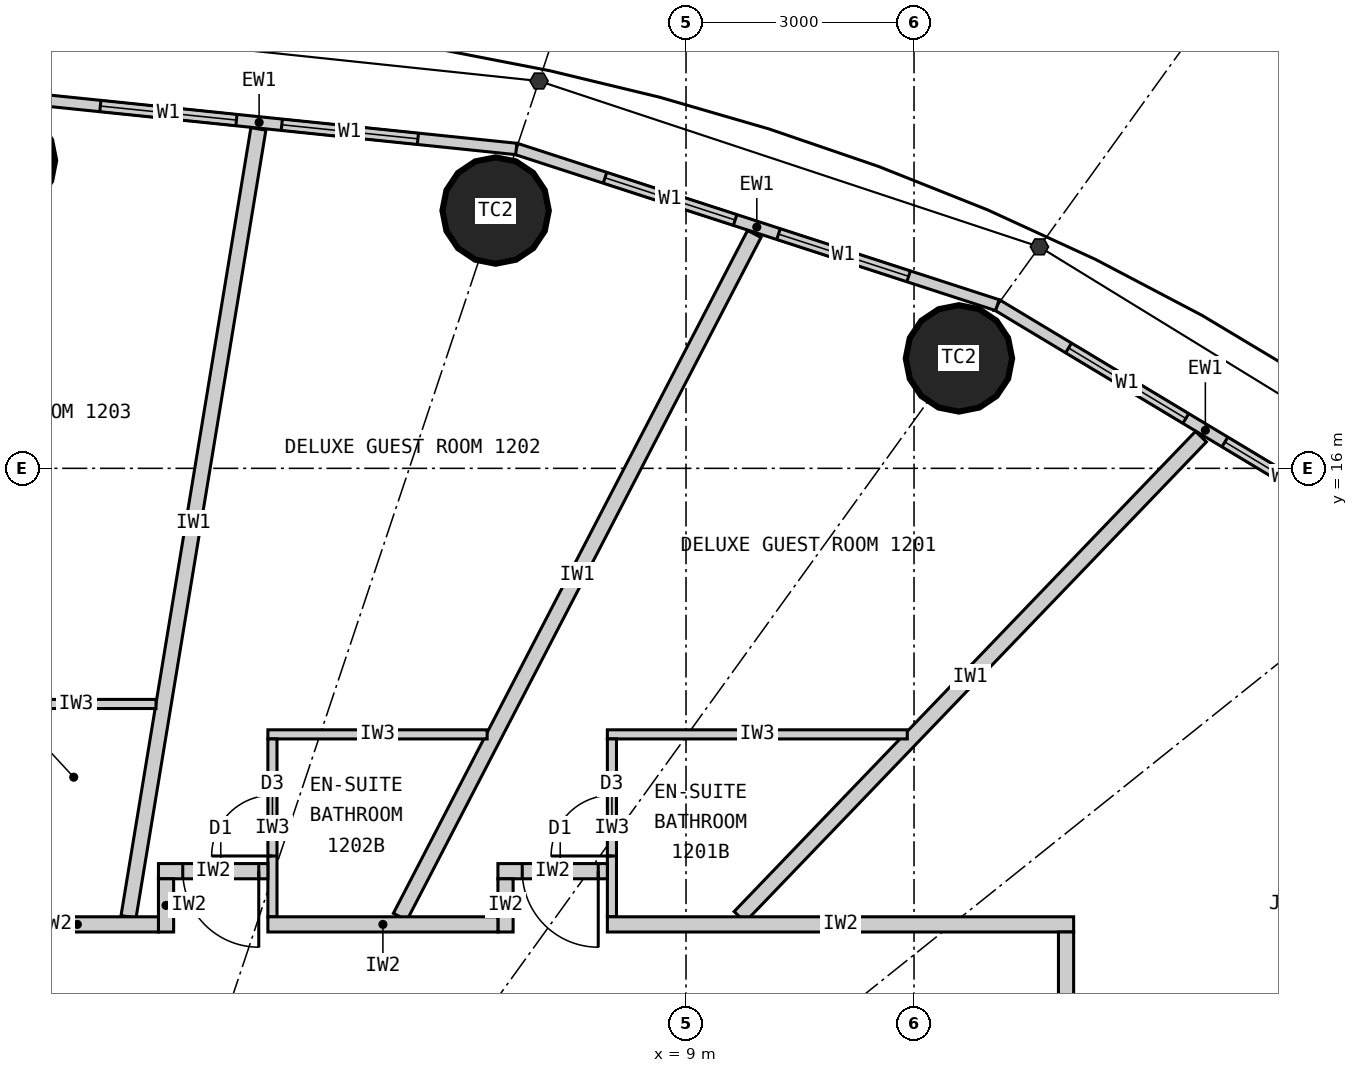
"""IFC4 building model, lengths in metres.
Left out: names, types, materials, properties, quantities, classifications, styles, units other than length and angle.
Written with IfcOpenShell. Run it as: python <this file> out.ifc"""

import sys

from ifc_helpers import new_model, si_unit, direction, frame, frame_2d, origin, origin_2d, place, context, subcontext, project, spatial, rectangle, circle, extrude, element, fill, save


model = new_model("IFC4")
c1 = context("Model", 3, precision=1e-05, world=origin(), true_north=direction((0.0, 1.0)))
c2 = subcontext(c1, "Body", "Model", "MODEL_VIEW")
j1 = project(units=[si_unit("LENGTHUNIT", "METRE"), si_unit("PLANEANGLEUNIT", "RADIAN")], contexts=[c1])
p1 = place(None, origin())
s1 = spatial("IfcSite", under=j1, at=p1, CompositionType="ELEMENT")
p2 = place(p1, origin())
s2 = spatial("IfcBuilding", under=s1, at=p2, CompositionType="ELEMENT")
p3 = place(p2, frame((0.0, 0.0, 54.0)))
s3 = spatial("IfcBuildingStorey", under=s2, at=p3, CompositionType="ELEMENT", Elevation=54.0)
for number, where, z_axis, x_axis in (
    (1, (12.591, 17.447, 0.0), (0.0, 0.0, 1.0), (1.0, 0.0, 0.0)),
    (2, (6.495, 19.391, 0.0), (0.0, 0.0, 1.0), (1.0, 0.0, 0.0)),
    (3, (0.0, 20.05, 0.0), (0.0, 0.0, 1.0), (1.0, 0.0, 0.0)),
):
    element("IfcColumn", number, at=place(p3, frame(where, z_axis=z_axis, x_axis=x_axis)), inside=s3, PredefinedType="COLUMN", context=c2, shape_type="SweptSolid", body=[
        extrude(circle(Radius=0.7, at=origin_2d()), origin(), (0.0, 0.0, 1.0), 3.3),
    ])
p4 = place(p3, frame((18.57, 14.856, 0.0), z_axis=(0.0, 0.0, 1.0), x_axis=(-0.856983180864, 0.515344377787, 0.0)))
e4 = element("IfcWall", 4, at=p4, inside=s3, PredefinedType="ELEMENTEDWALL", context=c2, shape_type="SweptSolid", body=[
    extrude(rectangle(XDim=6.386, YDim=0.15, at=frame_2d((3.193, 0.0))), origin(), (0.0, 0.0, 1.0), 3.12),
])
p5 = place(p4, frame((1.093, 0.0, 0.9)))
e5 = element("IfcOpeningElement", 5, at=p5, cuts=e4, PredefinedType="OPENING", context=c2, shape_type="SweptSolid", body=[
    extrude(rectangle(XDim=1.8, YDim=1.9, at=frame_2d((0.9, 0.95))), frame((0.0, 0.085, 0.0), z_axis=(0.0, -1.0, 0.0), x_axis=(1.0, 0.0, 0.0)), (0.0, 0.0, 1.0), 0.17),
])
p6 = place(p4, frame((3.493, 0.0, 0.9)))
e6 = element("IfcOpeningElement", 6, at=p6, cuts=e4, PredefinedType="OPENING", context=c2, shape_type="SweptSolid", body=[
    extrude(rectangle(XDim=1.8, YDim=1.9, at=frame_2d((0.9, 0.95))), frame((0.0, 0.085, 0.0), z_axis=(0.0, -1.0, 0.0), x_axis=(1.0, 0.0, 0.0)), (0.0, 0.0, 1.0), 0.17),
])
p7 = place(p3, frame((13.096, 18.147, 0.0), z_axis=(0.0, 0.0, 1.0), x_axis=(-0.951137534625, 0.308767534285, 0.0)))
e7 = element("IfcWall", 7, at=p7, inside=s3, PredefinedType="ELEMENTEDWALL", context=c2, shape_type="SweptSolid", body=[
    extrude(rectangle(XDim=6.655, YDim=0.15, at=frame_2d((3.328, 0.0))), origin(), (0.0, 0.0, 1.0), 3.12),
])
p8 = place(p7, frame((1.228, 0.0, 0.9)))
e8 = element("IfcOpeningElement", 8, at=p8, cuts=e7, PredefinedType="OPENING", context=c2, shape_type="SweptSolid", body=[
    extrude(rectangle(XDim=1.8, YDim=1.9, at=frame_2d((0.9, 0.95))), frame((0.0, 0.085, 0.0), z_axis=(0.0, -1.0, 0.0), x_axis=(1.0, 0.0, 0.0)), (0.0, 0.0, 1.0), 0.17),
])
p9 = place(p7, frame((3.628, 0.0, 0.9)))
e9 = element("IfcOpeningElement", 9, at=p9, cuts=e7, PredefinedType="OPENING", context=c2, shape_type="SweptSolid", body=[
    extrude(rectangle(XDim=1.8, YDim=1.9, at=frame_2d((0.9, 0.95))), frame((0.0, 0.085, 0.0), z_axis=(0.0, -1.0, 0.0), x_axis=(1.0, 0.0, 0.0)), (0.0, 0.0, 1.0), 0.17),
])
p10 = place(p3, frame((6.766, 20.202, 0.0), z_axis=(0.0, 0.0, 1.0), x_axis=(-0.994721394369, 0.102612609291, 0.0)))
e10 = element("IfcWall", 10, at=p10, inside=s3, PredefinedType="ELEMENTEDWALL", context=c2, shape_type="SweptSolid", body=[
    extrude(rectangle(XDim=6.802, YDim=0.15, at=frame_2d((3.401, 0.0))), origin(), (0.0, 0.0, 1.0), 3.12),
])
p11 = place(p10, frame((1.301, 0.0, 0.9)))
e11 = element("IfcOpeningElement", 11, at=p11, cuts=e10, PredefinedType="OPENING", context=c2, shape_type="SweptSolid", body=[
    extrude(rectangle(XDim=1.8, YDim=1.9, at=frame_2d((0.9, 0.95))), frame((0.0, 0.085, 0.0), z_axis=(0.0, -1.0, 0.0), x_axis=(1.0, 0.0, 0.0)), (0.0, 0.0, 1.0), 0.17),
])
p12 = place(p10, frame((3.701, 0.0, 0.9)))
e12 = element("IfcOpeningElement", 12, at=p12, cuts=e10, PredefinedType="OPENING", context=c2, shape_type="SweptSolid", body=[
    extrude(rectangle(XDim=1.8, YDim=1.9, at=frame_2d((0.9, 0.95))), frame((0.0, 0.085, 0.0), z_axis=(0.0, -1.0, 0.0), x_axis=(1.0, 0.0, 0.0)), (0.0, 0.0, 1.0), 0.17),
])
p13 = place(p3, frame((9.705, 10.1, 0.0), z_axis=(0.0, 0.0, 1.0), x_axis=(0.692879226267, 0.721053658064, 0.0)))
e13 = element("IfcWall", 13, at=p13, inside=s3, PredefinedType="PARTITIONING", context=c2, shape_type="SweptSolid", body=[
    extrude(rectangle(XDim=8.761, YDim=0.2, at=frame_2d((4.38, 0.0))), origin(), (0.0, 0.0, 1.0), 3.12),
])
p14 = place(p3, frame((5.239, 10.1, 0.0), z_axis=(0.0, 0.0, 1.0), x_axis=(0.460422783389, 0.887699758103, 0.0)))
e14 = element("IfcWall", 14, at=p14, inside=s3, PredefinedType="PARTITIONING", context=c2, shape_type="SweptSolid", body=[
    extrude(rectangle(XDim=10.12, YDim=0.2, at=frame_2d((5.06, 0.0))), origin(), (0.0, 0.0, 1.0), 3.12),
])
p15 = place(p3, frame((1.665, 10.1, 0.0), z_axis=(0.0, 0.0, 1.0), x_axis=(0.162657606458, 0.986682574621, 0.0)))
e15 = element("IfcWall", 15, at=p15, inside=s3, PredefinedType="PARTITIONING", context=c2, shape_type="SweptSolid", body=[
    extrude(rectangle(XDim=10.505, YDim=0.2, at=frame_2d((5.252, 0.0))), origin(), (0.0, 0.0, 1.0), 3.12),
])
p16 = place(p3, frame((11.911, 12.5, 0.0), z_axis=(0.0, 0.0, 1.0), x_axis=(-1.0, 0.0, 0.0)))
e16 = element("IfcWall", 16, at=p16, inside=s3, PredefinedType="PARTITIONING", context=c2, shape_type="SweptSolid", body=[
    extrude(rectangle(XDim=3.946, YDim=0.12, at=frame_2d((1.973, 0.0))), origin(), (0.0, 0.0, 1.0), 3.12),
])
p17 = place(p3, frame((8.025, 10.1, 0.0), z_axis=(0.0, 0.0, 1.0), x_axis=(0.0, 1.0, 0.0)))
e17 = element("IfcWall", 17, at=p17, inside=s3, PredefinedType="PARTITIONING", context=c2, shape_type="SweptSolid", body=[
    extrude(rectangle(XDim=2.34, YDim=0.12, at=frame_2d((1.17, 0.0))), origin(), (0.0, 0.0, 1.0), 3.12),
])
p18 = place(p17, frame((0.8, 0.0, 0.0)))
e18 = element("IfcOpeningElement", 18, at=p18, cuts=e17, PredefinedType="OPENING", context=c2, shape_type="SweptSolid", body=[
    extrude(rectangle(XDim=0.8, YDim=2.1, at=frame_2d((0.4, 1.05))), frame((0.0, 0.07, 0.0), z_axis=(0.0, -1.0, 0.0), x_axis=(1.0, 0.0, 0.0)), (0.0, 0.0, 1.0), 0.14),
])
p19 = place(p3, frame((6.383, 12.5, 0.0), z_axis=(0.0, 0.0, 1.0), x_axis=(-1.0, 0.0, 0.0)))
e19 = element("IfcWall", 19, at=p19, inside=s3, PredefinedType="PARTITIONING", context=c2, shape_type="SweptSolid", body=[
    extrude(rectangle(XDim=2.885, YDim=0.12, at=frame_2d((1.442, 0.0))), origin(), (0.0, 0.0, 1.0), 3.12),
])
p20 = place(p3, frame((3.559, 10.1, 0.0), z_axis=(0.0, 0.0, 1.0), x_axis=(0.0, 1.0, 0.0)))
e20 = element("IfcWall", 20, at=p20, inside=s3, PredefinedType="PARTITIONING", context=c2, shape_type="SweptSolid", body=[
    extrude(rectangle(XDim=2.34, YDim=0.12, at=frame_2d((1.17, 0.0))), origin(), (0.0, 0.0, 1.0), 3.12),
])
p21 = place(p20, frame((0.8, 0.0, 0.0)))
e21 = element("IfcOpeningElement", 21, at=p21, cuts=e20, PredefinedType="OPENING", context=c2, shape_type="SweptSolid", body=[
    extrude(rectangle(XDim=0.8, YDim=2.1, at=frame_2d((0.4, 1.05))), frame((0.0, 0.07, 0.0), z_axis=(0.0, -1.0, 0.0), x_axis=(1.0, 0.0, 0.0)), (0.0, 0.0, 1.0), 0.14),
])
p22 = place(p3, frame((2.027, 12.9, 0.0), z_axis=(0.0, 0.0, 1.0), x_axis=(-1.0, 0.0, 0.0)))
e22 = element("IfcWall", 22, at=p22, inside=s3, PredefinedType="PARTITIONING", context=c2, shape_type="SweptSolid", body=[
    extrude(rectangle(XDim=2.102, YDim=0.12, at=frame_2d((1.051, 0.0))), origin(), (0.0, 0.0, 1.0), 3.12),
])
p23 = place(p3, frame((6.525, 10.7, 0.0), z_axis=(0.0, 0.0, 1.0), x_axis=(1.0, 0.0, 0.0)))
e23 = element("IfcWall", 23, at=p23, inside=s3, PredefinedType="PARTITIONING", context=c2, shape_type="SweptSolid", body=[
    extrude(rectangle(XDim=1.44, YDim=0.2, at=frame_2d((0.72, 0.0))), origin(), (0.0, 0.0, 1.0), 3.12),
])
p24 = place(p23, frame((0.32, 0.0, 0.0)))
e24 = element("IfcOpeningElement", 24, at=p24, cuts=e23, PredefinedType="OPENING", context=c2, shape_type="SweptSolid", body=[
    extrude(rectangle(XDim=1.0, YDim=2.2, at=frame_2d((0.5, 1.1))), frame((0.0, 0.11, 0.0), z_axis=(0.0, -1.0, 0.0), x_axis=(1.0, 0.0, 0.0)), (0.0, 0.0, 1.0), 0.22),
])
p25 = place(p3, frame((6.625, 9.9, 0.0), z_axis=(0.0, 0.0, 1.0), x_axis=(0.0, 1.0, 0.0)))
e25 = element("IfcWall", 25, at=p25, inside=s3, PredefinedType="PARTITIONING", context=c2, shape_type="SweptSolid", body=[
    extrude(rectangle(XDim=0.7, YDim=0.2, at=frame_2d((0.35, 0.0))), origin(), (0.0, 0.0, 1.0), 3.12),
])
p26 = place(p3, frame((2.059, 10.7, 0.0), z_axis=(0.0, 0.0, 1.0), x_axis=(1.0, 0.0, 0.0)))
e26 = element("IfcWall", 26, at=p26, inside=s3, PredefinedType="PARTITIONING", context=c2, shape_type="SweptSolid", body=[
    extrude(rectangle(XDim=1.44, YDim=0.2, at=frame_2d((0.72, 0.0))), origin(), (0.0, 0.0, 1.0), 3.12),
])
p27 = place(p26, frame((0.32, 0.0, 0.0)))
e27 = element("IfcOpeningElement", 27, at=p27, cuts=e26, PredefinedType="OPENING", context=c2, shape_type="SweptSolid", body=[
    extrude(rectangle(XDim=1.0, YDim=2.2, at=frame_2d((0.5, 1.1))), frame((0.0, 0.11, 0.0), z_axis=(0.0, -1.0, 0.0), x_axis=(1.0, 0.0, 0.0)), (0.0, 0.0, 1.0), 0.22),
])
p28 = place(p3, frame((2.159, 9.9, 0.0), z_axis=(0.0, 0.0, 1.0), x_axis=(0.0, 1.0, 0.0)))
e28 = element("IfcWall", 28, at=p28, inside=s3, PredefinedType="PARTITIONING", context=c2, shape_type="SweptSolid", body=[
    extrude(rectangle(XDim=0.7, YDim=0.2, at=frame_2d((0.35, 0.0))), origin(), (0.0, 0.0, 1.0), 3.12),
])
p29 = place(p3, frame((-0.075, 10.0, 0.0), z_axis=(0.0, 0.0, 1.0), x_axis=(1.0, 0.0, 0.0)))
e29 = element("IfcWall", 29, at=p29, inside=s3, PredefinedType="PARTITIONING", context=c2, shape_type="SweptSolid", body=[
    extrude(rectangle(XDim=2.134, YDim=0.2, at=frame_2d((1.067, 0.0))), origin(), (0.0, 0.0, 1.0), 3.12),
])
p30 = place(p3, frame((3.499, 10.0, 0.0), z_axis=(0.0, 0.0, 1.0), x_axis=(1.0, 0.0, 0.0)))
e30 = element("IfcWall", 30, at=p30, inside=s3, PredefinedType="PARTITIONING", context=c2, shape_type="SweptSolid", body=[
    extrude(rectangle(XDim=3.027, YDim=0.2, at=frame_2d((1.513, 0.0))), origin(), (0.0, 0.0, 1.0), 3.12),
])
p31 = place(p3, frame((7.965, 10.0, 0.0), z_axis=(0.0, 0.0, 1.0), x_axis=(1.0, 0.0, 0.0)))
e31 = element("IfcWall", 31, at=p31, inside=s3, PredefinedType="PARTITIONING", context=c2, shape_type="SweptSolid", body=[
    extrude(rectangle(XDim=6.135, YDim=0.2, at=frame_2d((3.067, 0.0))), origin(), (0.0, 0.0, 1.0), 3.12),
])
p32 = place(p3, frame((14.0, -5.459, 0.0), z_axis=(0.0, 0.0, 1.0), x_axis=(0.0, 1.0, 0.0)))
e32 = element("IfcWall", 32, at=p32, inside=s3, PredefinedType="PARTITIONING", context=c2, shape_type="SweptSolid", body=[
    extrude(rectangle(XDim=15.359, YDim=0.2, at=frame_2d((7.679, 0.0))), origin(), (0.0, 0.0, 1.0), 3.12),
])
p33 = place(p32, frame((2.656, 0.0, 0.0)))
e33 = element("IfcOpeningElement", 33, at=p33, cuts=e32, PredefinedType="OPENING", context=c2, shape_type="SweptSolid", body=[
    extrude(rectangle(XDim=1.0, YDim=2.2, at=frame_2d((0.5, 1.1))), frame((0.0, 0.11, 0.0), z_axis=(0.0, -1.0, 0.0), x_axis=(1.0, 0.0, 0.0)), (0.0, 0.0, 1.0), 0.22),
])
p34 = place(p32, frame((6.537, 0.0, 0.0)))
e34 = element("IfcOpeningElement", 34, at=p34, cuts=e32, PredefinedType="OPENING", context=c2, shape_type="SweptSolid", body=[
    extrude(rectangle(XDim=1.0, YDim=2.2, at=frame_2d((0.5, 1.1))), frame((0.0, 0.11, 0.0), z_axis=(0.0, -1.0, 0.0), x_axis=(1.0, 0.0, 0.0)), (0.0, 0.0, 1.0), 0.22),
])
p35 = place(p32, frame((12.682, 0.0, 0.0)))
e35 = element("IfcOpeningElement", 35, at=p35, cuts=e32, PredefinedType="OPENING", context=c2, shape_type="SweptSolid", body=[
    extrude(rectangle(XDim=1.0, YDim=2.2, at=frame_2d((0.5, 1.1))), frame((0.0, 0.11, 0.0), z_axis=(0.0, -1.0, 0.0), x_axis=(1.0, 0.0, 0.0)), (0.0, 0.0, 1.0), 0.22),
])
p36 = place(p5, origin())
e36 = element("IfcWindow", 36, at=p36, inside=s3, PartitioningType="SINGLE_PANEL", PredefinedType="WINDOW", context=c2, shape_type="SweptSolid", body=[
    extrude(rectangle(XDim=1.8, YDim=1.9, at=frame_2d((0.9, 0.95))), frame((0.0, 0.03, 0.0), z_axis=(0.0, -1.0, 0.0), x_axis=(1.0, 0.0, 0.0)), (0.0, 0.0, 1.0), 0.06),
])
fill(e5, e36)
p37 = place(p6, origin())
e37 = element("IfcWindow", 37, at=p37, inside=s3, PartitioningType="SINGLE_PANEL", PredefinedType="WINDOW", context=c2, shape_type="SweptSolid", body=[
    extrude(rectangle(XDim=1.8, YDim=1.9, at=frame_2d((0.9, 0.95))), frame((0.0, 0.03, 0.0), z_axis=(0.0, -1.0, 0.0), x_axis=(1.0, 0.0, 0.0)), (0.0, 0.0, 1.0), 0.06),
])
fill(e6, e37)
p38 = place(p8, origin())
e38 = element("IfcWindow", 38, at=p38, inside=s3, PartitioningType="SINGLE_PANEL", PredefinedType="WINDOW", context=c2, shape_type="SweptSolid", body=[
    extrude(rectangle(XDim=1.8, YDim=1.9, at=frame_2d((0.9, 0.95))), frame((0.0, 0.03, 0.0), z_axis=(0.0, -1.0, 0.0), x_axis=(1.0, 0.0, 0.0)), (0.0, 0.0, 1.0), 0.06),
])
fill(e8, e38)
p39 = place(p9, origin())
e39 = element("IfcWindow", 39, at=p39, inside=s3, PartitioningType="SINGLE_PANEL", PredefinedType="WINDOW", context=c2, shape_type="SweptSolid", body=[
    extrude(rectangle(XDim=1.8, YDim=1.9, at=frame_2d((0.9, 0.95))), frame((0.0, 0.03, 0.0), z_axis=(0.0, -1.0, 0.0), x_axis=(1.0, 0.0, 0.0)), (0.0, 0.0, 1.0), 0.06),
])
fill(e9, e39)
p40 = place(p11, origin())
e40 = element("IfcWindow", 40, at=p40, inside=s3, PartitioningType="SINGLE_PANEL", PredefinedType="WINDOW", context=c2, shape_type="SweptSolid", body=[
    extrude(rectangle(XDim=1.8, YDim=1.9, at=frame_2d((0.9, 0.95))), frame((0.0, 0.03, 0.0), z_axis=(0.0, -1.0, 0.0), x_axis=(1.0, 0.0, 0.0)), (0.0, 0.0, 1.0), 0.06),
])
fill(e11, e40)
p41 = place(p12, origin())
e41 = element("IfcWindow", 41, at=p41, inside=s3, PartitioningType="SINGLE_PANEL", PredefinedType="WINDOW", context=c2, shape_type="SweptSolid", body=[
    extrude(rectangle(XDim=1.8, YDim=1.9, at=frame_2d((0.9, 0.95))), frame((0.0, 0.03, 0.0), z_axis=(0.0, -1.0, 0.0), x_axis=(1.0, 0.0, 0.0)), (0.0, 0.0, 1.0), 0.06),
])
fill(e12, e41)
p42 = place(p18, origin())
e42 = element("IfcDoor", 42, at=p42, inside=s3, OperationType="SINGLE_SWING_LEFT", PredefinedType="DOOR", context=c2, shape_type="SweptSolid", body=[
    extrude(rectangle(XDim=0.8, YDim=2.1, at=frame_2d((0.4, 1.05))), frame((0.0, 0.025, 0.0), z_axis=(0.0, -1.0, 0.0), x_axis=(1.0, 0.0, 0.0)), (0.0, 0.0, 1.0), 0.05),
])
fill(e18, e42)
p43 = place(p24, origin())
e43 = element("IfcDoor", 43, at=p43, inside=s3, OperationType="SINGLE_SWING_RIGHT", PredefinedType="DOOR", context=c2, shape_type="SweptSolid", body=[
    extrude(rectangle(XDim=1.0, YDim=2.2, at=frame_2d((0.5, 1.1))), frame((0.0, 0.025, 0.0), z_axis=(0.0, -1.0, 0.0), x_axis=(1.0, 0.0, 0.0)), (0.0, 0.0, 1.0), 0.05),
])
fill(e24, e43)
p44 = place(p21, origin())
e44 = element("IfcDoor", 44, at=p44, inside=s3, OperationType="SINGLE_SWING_LEFT", PredefinedType="DOOR", context=c2, shape_type="SweptSolid", body=[
    extrude(rectangle(XDim=0.8, YDim=2.1, at=frame_2d((0.4, 1.05))), frame((0.0, 0.025, 0.0), z_axis=(0.0, -1.0, 0.0), x_axis=(1.0, 0.0, 0.0)), (0.0, 0.0, 1.0), 0.05),
])
fill(e21, e44)
p45 = place(p27, origin())
e45 = element("IfcDoor", 45, at=p45, inside=s3, OperationType="SINGLE_SWING_RIGHT", PredefinedType="DOOR", context=c2, shape_type="SweptSolid", body=[
    extrude(rectangle(XDim=1.0, YDim=2.2, at=frame_2d((0.5, 1.1))), frame((0.0, 0.025, 0.0), z_axis=(0.0, -1.0, 0.0), x_axis=(1.0, 0.0, 0.0)), (0.0, 0.0, 1.0), 0.05),
])
fill(e27, e45)
save(model, sys.argv[1])
